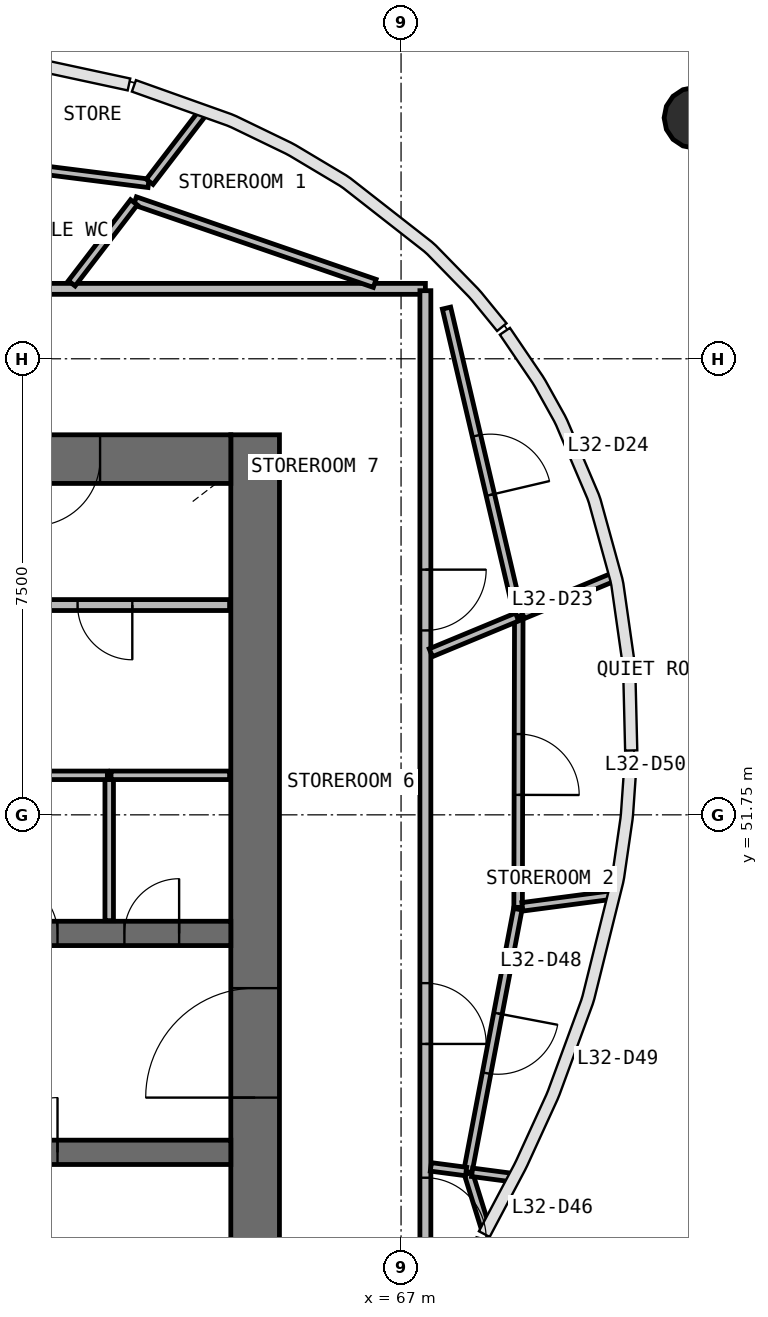
"""IFC4 building model, lengths in metres.
Left out: names, types, materials, properties, quantities, classifications, styles, units other than length and angle.
Written with IfcOpenShell. Run it as: python <this file> out.ifc"""

import sys

from ifc_helpers import new_model, si_unit, direction, frame, frame_2d, origin, origin_2d, place, context, subcontext, project, spatial, rectangle, circle, extrude, source, transform, mapped, element, fill, save


model = new_model("IFC4")
c1 = context("Model", 3, precision=1e-05, world=origin(), true_north=direction((0.0, 1.0)))
c2 = subcontext(c1, "Body", "Model", "MODEL_VIEW")
j1 = project(units=[si_unit("LENGTHUNIT", "METRE"), si_unit("PLANEANGLEUNIT", "RADIAN")], contexts=[c1])
p1 = place(None, origin())
s1 = spatial("IfcSite", under=j1, at=p1, CompositionType="ELEMENT")
p2 = place(p1, origin())
s2 = spatial("IfcBuilding", under=s1, at=p2, CompositionType="ELEMENT")
p3 = place(p2, frame((0.0, 0.0, 137.0)))
s3 = spatial("IfcBuildingStorey", under=s2, at=p3, CompositionType="ELEMENT", Elevation=137.0)
p4 = place(p3, frame((64.6, 38.0, 0.0), z_axis=(0.0, 0.0, 1.0), x_axis=(0.0, 1.0, 0.0)))
e1 = element("IfcWall", 1, at=p4, inside=s3, PredefinedType="SHEAR", context=c2, shape_type="SweptSolid", body=[
    extrude(rectangle(XDim=20.0, YDim=0.8, at=frame_2d((10.0, 0.0))), origin(), (0.0, 0.0, 1.0), 3.9),
])
p5 = place(p4, frame((9.1, 0.0, 0.0)))
e2 = element("IfcOpeningElement", 2, at=p5, cuts=e1, PredefinedType="OPENING", context=c2, shape_type="SweptSolid", body=[
    extrude(rectangle(XDim=1.8, YDim=2.1, at=frame_2d((0.9, 1.05))), frame((0.0, 0.41, 0.0), z_axis=(0.0, -1.0, 0.0), x_axis=(1.0, 0.0, 0.0)), (0.0, 0.0, 1.0), 0.82),
])
p6 = place(p3, frame((64.2, 57.6, 0.0), z_axis=(0.0, 0.0, 1.0), x_axis=(-1.0, 0.0, 0.0)))
e3 = element("IfcWall", 3, at=p6, inside=s3, PredefinedType="SHEAR", context=c2, shape_type="SweptSolid", body=[
    extrude(rectangle(XDim=24.4, YDim=0.8, at=frame_2d((12.2, 0.0))), origin(), (0.0, 0.0, 1.0), 3.9),
])
p7 = place(p6, frame((21.65, 0.0, 0.0)))
e4 = element("IfcOpeningElement", 4, at=p7, cuts=e3, PredefinedType="OPENING", context=c2, shape_type="SweptSolid", body=[
    extrude(rectangle(XDim=1.1, YDim=2.1, at=frame_2d((0.55, 1.05))), frame((0.0, 0.41, 0.0), z_axis=(0.0, -1.0, 0.0), x_axis=(1.0, 0.0, 0.0)), (0.0, 0.0, 1.0), 0.82),
])
p8 = place(p6, frame((2.15, 0.0, 0.0)))
e5 = element("IfcOpeningElement", 5, at=p8, cuts=e3, PredefinedType="OPENING", context=c2, shape_type="SweptSolid", body=[
    extrude(rectangle(XDim=1.1, YDim=2.1, at=frame_2d((0.55, 1.05))), frame((0.0, 0.41, 0.0), z_axis=(0.0, -1.0, 0.0), x_axis=(1.0, 0.0, 0.0)), (0.0, 0.0, 1.0), 0.82),
])
p9 = place(p3, frame((39.8, 49.8, 0.0), z_axis=(0.0, 0.0, 1.0), x_axis=(1.0, 0.0, 0.0)))
e6 = element("IfcWall", 6, at=p9, inside=s3, PredefinedType="SHEAR", context=c2, shape_type="SweptSolid", body=[
    extrude(rectangle(XDim=24.4, YDim=0.4, at=frame_2d((12.2, 0.0))), origin(), (0.0, 0.0, 1.0), 3.9),
])
p10 = place(p9, frame((13.6, 0.0, 0.0)))
e7 = element("IfcOpeningElement", 7, at=p10, cuts=e6, PredefinedType="OPENING", context=c2, shape_type="SweptSolid", body=[
    extrude(rectangle(XDim=1.1, YDim=2.1, at=frame_2d((0.55, 1.05))), frame((0.0, 0.21, 0.0), z_axis=(0.0, -1.0, 0.0), x_axis=(1.0, 0.0, 0.0)), (0.0, 0.0, 1.0), 0.42),
])
p11 = place(p9, frame((16.1, 0.0, 0.0)))
e8 = element("IfcOpeningElement", 8, at=p11, cuts=e6, PredefinedType="OPENING", context=c2, shape_type="SweptSolid", body=[
    extrude(rectangle(XDim=1.1, YDim=2.1, at=frame_2d((0.55, 1.05))), frame((0.0, 0.21, 0.0), z_axis=(0.0, -1.0, 0.0), x_axis=(1.0, 0.0, 0.0)), (0.0, 0.0, 1.0), 0.42),
])
p12 = place(p9, frame((18.6, 0.0, 0.0)))
e9 = element("IfcOpeningElement", 9, at=p12, cuts=e6, PredefinedType="OPENING", context=c2, shape_type="SweptSolid", body=[
    extrude(rectangle(XDim=1.1, YDim=2.1, at=frame_2d((0.55, 1.05))), frame((0.0, 0.21, 0.0), z_axis=(0.0, -1.0, 0.0), x_axis=(1.0, 0.0, 0.0)), (0.0, 0.0, 1.0), 0.42),
])
p13 = place(p9, frame((20.65, 0.0, 0.0)))
e10 = element("IfcOpeningElement", 10, at=p13, cuts=e6, PredefinedType="OPENING", context=c2, shape_type="SweptSolid", body=[
    extrude(rectangle(XDim=0.9, YDim=2.1, at=frame_2d((0.45, 1.05))), frame((0.0, 0.21, 0.0), z_axis=(0.0, -1.0, 0.0), x_axis=(1.0, 0.0, 0.0)), (0.0, 0.0, 1.0), 0.42),
])
p14 = place(p9, frame((22.65, 0.0, 0.0)))
e11 = element("IfcOpeningElement", 11, at=p14, cuts=e6, PredefinedType="OPENING", context=c2, shape_type="SweptSolid", body=[
    extrude(rectangle(XDim=0.9, YDim=2.1, at=frame_2d((0.45, 1.05))), frame((0.0, 0.21, 0.0), z_axis=(0.0, -1.0, 0.0), x_axis=(1.0, 0.0, 0.0)), (0.0, 0.0, 1.0), 0.42),
])
p15 = place(p3, frame((39.8, 46.2, 0.0), z_axis=(0.0, 0.0, 1.0), x_axis=(1.0, 0.0, 0.0)))
e12 = element("IfcWall", 12, at=p15, inside=s3, PredefinedType="SHEAR", context=c2, shape_type="SweptSolid", body=[
    extrude(rectangle(XDim=24.4, YDim=0.4, at=frame_2d((12.2, 0.0))), origin(), (0.0, 0.0, 1.0), 3.9),
])
p16 = place(p15, frame((13.6, 0.0, 0.0)))
e13 = element("IfcOpeningElement", 13, at=p16, cuts=e12, PredefinedType="OPENING", context=c2, shape_type="SweptSolid", body=[
    extrude(rectangle(XDim=1.1, YDim=2.1, at=frame_2d((0.55, 1.05))), frame((0.0, 0.21, 0.0), z_axis=(0.0, -1.0, 0.0), x_axis=(1.0, 0.0, 0.0)), (0.0, 0.0, 1.0), 0.42),
])
p17 = place(p15, frame((16.1, 0.0, 0.0)))
e14 = element("IfcOpeningElement", 14, at=p17, cuts=e12, PredefinedType="OPENING", context=c2, shape_type="SweptSolid", body=[
    extrude(rectangle(XDim=1.1, YDim=2.1, at=frame_2d((0.55, 1.05))), frame((0.0, 0.21, 0.0), z_axis=(0.0, -1.0, 0.0), x_axis=(1.0, 0.0, 0.0)), (0.0, 0.0, 1.0), 0.42),
])
p18 = place(p15, frame((18.6, 0.0, 0.0)))
e15 = element("IfcOpeningElement", 15, at=p18, cuts=e12, PredefinedType="OPENING", context=c2, shape_type="SweptSolid", body=[
    extrude(rectangle(XDim=1.1, YDim=2.1, at=frame_2d((0.55, 1.05))), frame((0.0, 0.21, 0.0), z_axis=(0.0, -1.0, 0.0), x_axis=(1.0, 0.0, 0.0)), (0.0, 0.0, 1.0), 0.42),
])
p19 = place(p15, frame((20.65, 0.0, 0.0)))
e16 = element("IfcOpeningElement", 16, at=p19, cuts=e12, PredefinedType="OPENING", context=c2, shape_type="SweptSolid", body=[
    extrude(rectangle(XDim=0.9, YDim=2.1, at=frame_2d((0.45, 1.05))), frame((0.0, 0.21, 0.0), z_axis=(0.0, -1.0, 0.0), x_axis=(1.0, 0.0, 0.0)), (0.0, 0.0, 1.0), 0.42),
])
p20 = place(p15, frame((2.85, 0.0, 0.0)))
e17 = element("IfcOpeningElement", 17, at=p20, cuts=e12, PredefinedType="OPENING", context=c2, shape_type="SweptSolid", body=[
    extrude(rectangle(XDim=0.9, YDim=2.1, at=frame_2d((0.45, 1.05))), frame((0.0, 0.21, 0.0), z_axis=(0.0, -1.0, 0.0), x_axis=(1.0, 0.0, 0.0)), (0.0, 0.0, 1.0), 0.42),
])
m1 = source(origin(), c2, "Body", "SweptSolid", [
    extrude(circle(Radius=0.5, at=origin_2d()), origin(), (0.0, 0.0, 1.0), 3.9),
])
p21 = place(p3, frame((71.826, 63.213, 0.0), z_axis=(0.0, 0.0, 1.0), x_axis=(1.0, 0.0, 0.0)))
e18 = element("IfcColumn", 18, at=p21, inside=s3, PredefinedType="COLUMN", context=c2, shape_type="MappedRepresentation", body=[
    mapped(m1, transform((0.0, 0.0, 0.0), scale=1.0)),
])
p22 = place(p3, frame((36.6, 60.4, 0.0), z_axis=(0.0, 0.0, 1.0), x_axis=(1.0, 0.0, 0.0)))
e19 = element("IfcWall", 19, at=p22, inside=s3, PredefinedType="PARTITIONING", context=c2, shape_type="SweptSolid", body=[
    extrude(rectangle(XDim=30.8, YDim=0.18, at=frame_2d((15.4, 0.0))), origin(), (0.0, 0.0, 1.0), 2.88),
])
p23 = place(p22, frame((22.25, 0.0, 0.0)))
e20 = element("IfcOpeningElement", 20, at=p23, cuts=e19, PredefinedType="OPENING", context=c2, shape_type="SweptSolid", body=[
    extrude(rectangle(XDim=0.9, YDim=2.1, at=frame_2d((0.45, 1.05))), frame((0.0, 0.1, 0.0), z_axis=(0.0, -1.0, 0.0), x_axis=(1.0, 0.0, 0.0)), (0.0, 0.0, 1.0), 0.2),
])
p24 = place(p22, frame((19.65, 0.0, 0.0)))
e21 = element("IfcOpeningElement", 21, at=p24, cuts=e19, PredefinedType="OPENING", context=c2, shape_type="SweptSolid", body=[
    extrude(rectangle(XDim=0.9, YDim=2.1, at=frame_2d((0.45, 1.05))), frame((0.0, 0.1, 0.0), z_axis=(0.0, -1.0, 0.0), x_axis=(1.0, 0.0, 0.0)), (0.0, 0.0, 1.0), 0.2),
])
p25 = place(p22, frame((17.25, 0.0, 0.0)))
e22 = element("IfcOpeningElement", 22, at=p25, cuts=e19, PredefinedType="OPENING", context=c2, shape_type="SweptSolid", body=[
    extrude(rectangle(XDim=0.9, YDim=2.1, at=frame_2d((0.45, 1.05))), frame((0.0, 0.1, 0.0), z_axis=(0.0, -1.0, 0.0), x_axis=(1.0, 0.0, 0.0)), (0.0, 0.0, 1.0), 0.2),
])
p26 = place(p22, frame((14.95, 0.0, 0.0)))
e23 = element("IfcOpeningElement", 23, at=p26, cuts=e19, PredefinedType="OPENING", context=c2, shape_type="SweptSolid", body=[
    extrude(rectangle(XDim=1.0, YDim=2.1, at=frame_2d((0.5, 1.05))), frame((0.0, 0.1, 0.0), z_axis=(0.0, -1.0, 0.0), x_axis=(1.0, 0.0, 0.0)), (0.0, 0.0, 1.0), 0.2),
])
p27 = place(p3, frame((67.4, 60.37, 0.0), z_axis=(0.0, 0.0, 1.0), x_axis=(0.0, -1.0, 0.0)))
e24 = element("IfcWall", 24, at=p27, inside=s3, PredefinedType="PARTITIONING", context=c2, shape_type="SweptSolid", body=[
    extrude(rectangle(XDim=23.638, YDim=0.18, at=frame_2d((11.819, 0.0))), origin(), (0.0, 0.0, 1.0), 2.88),
])
p28 = place(p27, frame((4.587, 0.0, 0.0)))
e25 = element("IfcOpeningElement", 25, at=p28, cuts=e24, PredefinedType="OPENING", context=c2, shape_type="SweptSolid", body=[
    extrude(rectangle(XDim=1.0, YDim=2.1, at=frame_2d((0.5, 1.05))), frame((0.0, 0.1, 0.0), z_axis=(0.0, -1.0, 0.0), x_axis=(1.0, 0.0, 0.0)), (0.0, 0.0, 1.0), 0.2),
])
p29 = place(p27, frame((14.587, 0.0, 0.0)))
e26 = element("IfcOpeningElement", 26, at=p29, cuts=e24, PredefinedType="OPENING", context=c2, shape_type="SweptSolid", body=[
    extrude(rectangle(XDim=1.0, YDim=2.1, at=frame_2d((0.5, 1.05))), frame((0.0, 0.1, 0.0), z_axis=(0.0, -1.0, 0.0), x_axis=(1.0, 0.0, 0.0)), (0.0, 0.0, 1.0), 0.2),
])
p30 = place(p27, frame((11.387, 0.0, 0.0)))
e27 = element("IfcOpeningElement", 27, at=p30, cuts=e24, PredefinedType="OPENING", context=c2, shape_type="SweptSolid", body=[
    extrude(rectangle(XDim=1.0, YDim=2.1, at=frame_2d((0.5, 1.05))), frame((0.0, 0.1, 0.0), z_axis=(0.0, -1.0, 0.0), x_axis=(1.0, 0.0, 0.0)), (0.0, 0.0, 1.0), 0.2),
])
p31 = place(p3, frame((64.18, 55.2, 0.0), z_axis=(0.0, 0.0, 1.0), x_axis=(-1.0, 0.0, 0.0)))
e28 = element("IfcWall", 28, at=p31, inside=s3, PredefinedType="PARTITIONING", context=c2, shape_type="SweptSolid", body=[
    extrude(rectangle(XDim=3.95, YDim=0.18, at=frame_2d((1.975, 0.0))), origin(), (0.0, 0.0, 1.0), 2.7),
])
p32 = place(p31, frame((1.6, 0.0, 0.0)))
e29 = element("IfcOpeningElement", 29, at=p32, cuts=e28, PredefinedType="OPENING", context=c2, shape_type="SweptSolid", body=[
    extrude(rectangle(XDim=0.9, YDim=2.1, at=frame_2d((0.45, 1.05))), frame((0.0, 0.1, 0.0), z_axis=(0.0, -1.0, 0.0), x_axis=(1.0, 0.0, 0.0)), (0.0, 0.0, 1.0), 0.2),
])
p33 = place(p3, frame((67.748, 60.083, 0.0), z_axis=(0.0, 0.0, 1.0), x_axis=(0.228252449255, -0.973601982028, 0.0)))
e30 = element("IfcWall", 30, at=p33, inside=s3, PredefinedType="PARTITIONING", context=c2, shape_type="SweptSolid", body=[
    extrude(rectangle(XDim=5.206, YDim=0.14, at=frame_2d((2.603, 0.0))), origin(), (0.0, 0.0, 1.0), 2.88),
])
p34 = place(p33, frame((2.156, 0.0, 0.0)))
e31 = element("IfcOpeningElement", 31, at=p34, cuts=e30, PredefinedType="OPENING", context=c2, shape_type="SweptSolid", body=[
    extrude(rectangle(XDim=1.0, YDim=2.1, at=frame_2d((0.5, 1.05))), frame((0.0, 0.08, 0.0), z_axis=(0.0, -1.0, 0.0), x_axis=(1.0, 0.0, 0.0)), (0.0, 0.0, 1.0), 0.16),
])
p35 = place(p3, frame((68.936, 54.985, 0.0), z_axis=(0.0, 0.0, 1.0), x_axis=(-0.002258257432, -0.999997450133, 0.0)))
e32 = element("IfcWall", 32, at=p35, inside=s3, PredefinedType="PARTITIONING", context=c2, shape_type="SweptSolid", body=[
    extrude(rectangle(XDim=4.757, YDim=0.14, at=frame_2d((2.378, 0.0))), origin(), (0.0, 0.0, 1.0), 2.88),
])
p36 = place(p35, frame((1.907, 0.0, 0.0)))
e33 = element("IfcOpeningElement", 33, at=p36, cuts=e32, PredefinedType="OPENING", context=c2, shape_type="SweptSolid", body=[
    extrude(rectangle(XDim=1.0, YDim=2.1, at=frame_2d((0.5, 1.05))), frame((0.0, 0.08, 0.0), z_axis=(0.0, -1.0, 0.0), x_axis=(1.0, 0.0, 0.0)), (0.0, 0.0, 1.0), 0.16),
])
p37 = place(p3, frame((62.847, 62.136, 0.0), z_axis=(0.0, 0.0, 1.0), x_axis=(-0.992110428367, 0.125367052792, 0.0)))
e34 = element("IfcWall", 34, at=p37, inside=s3, PredefinedType="PARTITIONING", context=c2, shape_type="SweptSolid", body=[
    extrude(rectangle(XDim=4.781, YDim=0.14, at=frame_2d((2.39, 0.0))), origin(), (0.0, 0.0, 1.0), 2.88),
])
p38 = place(p3, frame((66.567, 60.49, 0.0), z_axis=(0.0, 0.0, 1.0), x_axis=(-0.94557008328, 0.325418526834, 0.0)))
e35 = element("IfcWall", 35, at=p38, inside=s3, PredefinedType="PARTITIONING", context=c2, shape_type="SweptSolid", body=[
    extrude(rectangle(XDim=4.169, YDim=0.14, at=frame_2d((2.084, 0.0))), origin(), (0.0, 0.0, 1.0), 2.88),
])
p39 = place(p3, frame((68.92, 50.199, 0.0), z_axis=(0.0, 0.0, 1.0), x_axis=(-0.186739450269, -0.982409475582, 0.0)))
e36 = element("IfcWall", 36, at=p39, inside=s3, PredefinedType="PARTITIONING", context=c2, shape_type="SweptSolid", body=[
    extrude(rectangle(XDim=4.396, YDim=0.14, at=frame_2d((2.198, 0.0))), origin(), (0.0, 0.0, 1.0), 2.88),
])
p40 = place(p39, frame((1.746, 0.0, 0.0)))
e37 = element("IfcOpeningElement", 37, at=p40, cuts=e36, PredefinedType="OPENING", context=c2, shape_type="SweptSolid", body=[
    extrude(rectangle(XDim=1.0, YDim=2.1, at=frame_2d((0.5, 1.05))), frame((0.0, 0.08, 0.0), z_axis=(0.0, -1.0, 0.0), x_axis=(1.0, 0.0, 0.0)), (0.0, 0.0, 1.0), 0.16),
])
p41 = place(p3, frame((62.2, 50.01, 0.0), z_axis=(0.0, 0.0, 1.0), x_axis=(0.0, 1.0, 0.0)))
e38 = element("IfcWall", 38, at=p41, inside=s3, PredefinedType="PARTITIONING", context=c2, shape_type="SweptSolid", body=[
    extrude(rectangle(XDim=2.39, YDim=0.14, at=frame_2d((1.195, 0.0))), origin(), (0.0, 0.0, 1.0), 2.88),
])
p42 = place(p3, frame((62.17, 52.4, 0.0), z_axis=(0.0, 0.0, 1.0), x_axis=(-1.0, 0.0, 0.0)))
e39 = element("IfcWall", 39, at=p42, inside=s3, PredefinedType="PARTITIONING", context=c2, shape_type="SweptSolid", body=[
    extrude(rectangle(XDim=1.94, YDim=0.14, at=frame_2d((0.97, 0.0))), origin(), (0.0, 0.0, 1.0), 2.88),
])
p43 = place(p3, frame((64.18, 52.4, 0.0), z_axis=(0.0, 0.0, 1.0), x_axis=(-1.0, 0.0, 0.0)))
e40 = element("IfcWall", 40, at=p43, inside=s3, PredefinedType="PARTITIONING", context=c2, shape_type="SweptSolid", body=[
    extrude(rectangle(XDim=1.95, YDim=0.14, at=frame_2d((0.975, 0.0))), origin(), (0.0, 0.0, 1.0), 2.88),
])
p44 = place(p3, frame((62.865, 62.16, 0.0), z_axis=(0.0, 0.0, 1.0), x_axis=(0.608793777292, 0.793328517532, 0.0)))
e41 = element("IfcWall", 41, at=p44, inside=s3, PredefinedType="PARTITIONING", context=c2, shape_type="SweptSolid", body=[
    extrude(rectangle(XDim=1.429, YDim=0.14, at=frame_2d((0.714, 0.0))), origin(), (0.0, 0.0, 1.0), 2.88),
])
p45 = place(p3, frame((61.584, 60.49, 0.0), z_axis=(0.0, 0.0, 1.0), x_axis=(0.608776244605, 0.793341971664, 0.0)))
e42 = element("IfcWall", 42, at=p45, inside=s3, PredefinedType="PARTITIONING", context=c2, shape_type="SweptSolid", body=[
    extrude(rectangle(XDim=1.68, YDim=0.14, at=frame_2d((0.84, 0.0))), origin(), (0.0, 0.0, 1.0), 2.88),
])
p46 = place(p3, frame((69.002, 55.042, 0.0), z_axis=(0.0, 0.0, 1.0), x_axis=(0.923869135218, 0.382708532686, 0.0)))
e43 = element("IfcWall", 43, at=p46, inside=s3, PredefinedType="PARTITIONING", context=c2, shape_type="SweptSolid", body=[
    extrude(rectangle(XDim=1.592, YDim=0.14, at=frame_2d((0.796, 0.0))), origin(), (0.0, 0.0, 1.0), 2.88),
])
p47 = place(p3, frame((67.49, 54.416, 0.0), z_axis=(0.0, 0.0, 1.0), x_axis=(0.923912182985, 0.382604597635, 0.0)))
e44 = element("IfcWall", 44, at=p47, inside=s3, PredefinedType="PARTITIONING", context=c2, shape_type="SweptSolid", body=[
    extrude(rectangle(XDim=1.535, YDim=0.14, at=frame_2d((0.768, 0.0))), origin(), (0.0, 0.0, 1.0), 2.88),
])
p48 = place(p3, frame((68.995, 50.238, 0.0), z_axis=(0.0, 0.0, 1.0), x_axis=(0.991440137129, 0.130562071405, 0.0)))
e45 = element("IfcWall", 45, at=p48, inside=s3, PredefinedType="PARTITIONING", context=c2, shape_type="SweptSolid", body=[
    extrude(rectangle(XDim=1.468, YDim=0.14, at=frame_2d((0.734, 0.0))), origin(), (0.0, 0.0, 1.0), 2.88),
])
p49 = place(p3, frame((68.374, 45.0, 0.0), z_axis=(0.0, 0.0, 1.0), x_axis=(-0.29777626912, 0.954635686296, 0.0)))
e46 = element("IfcWall", 46, at=p49, inside=s3, PredefinedType="PARTITIONING", context=c2, shape_type="SweptSolid", body=[
    extrude(rectangle(XDim=0.892, YDim=0.14, at=frame_2d((0.446, 0.0))), origin(), (0.0, 0.0, 1.0), 2.88),
])
p50 = place(p3, frame((68.168, 45.871, 0.0), z_axis=(0.0, 0.0, 1.0), x_axis=(0.991464764419, -0.130374924413, 0.0)))
e47 = element("IfcWall", 47, at=p50, inside=s3, PredefinedType="PARTITIONING", context=c2, shape_type="SweptSolid", body=[
    extrude(rectangle(XDim=0.635, YDim=0.14, at=frame_2d((0.317, 0.0))), origin(), (0.0, 0.0, 1.0), 2.88),
])
p51 = place(p3, frame((67.49, 45.961, 0.0), z_axis=(0.0, 0.0, 1.0), x_axis=(0.991467089631, -0.130357240609, 0.0)))
e48 = element("IfcWall", 48, at=p51, inside=s3, PredefinedType="PARTITIONING", context=c2, shape_type="SweptSolid", body=[
    extrude(rectangle(XDim=0.584, YDim=0.14, at=frame_2d((0.292, 0.0))), origin(), (0.0, 0.0, 1.0), 2.88),
])
m2 = source(origin(), c2, "Body", "SweptSolid", [
    extrude(rectangle(XDim=1.8, YDim=2.1, at=frame_2d((0.9, 1.05))), frame((0.0, 0.025, 0.0), z_axis=(0.0, -1.0, 0.0), x_axis=(1.0, 0.0, 0.0)), (0.0, 0.0, 1.0), 0.05),
])
p52 = place(p5, origin())
e49 = element("IfcDoor", 49, at=p52, inside=s3, OperationType="SINGLE_SWING_LEFT", PredefinedType="DOOR", context=c2, shape_type="MappedRepresentation", body=[
    mapped(m2, transform((0.0, 0.0, 0.0), scale=1.0)),
])
fill(e2, e49)
m3 = source(origin(), c2, "Body", "SweptSolid", [
    extrude(rectangle(XDim=1.1, YDim=2.1, at=frame_2d((0.55, 1.05))), frame((0.0, 0.025, 0.0), z_axis=(0.0, -1.0, 0.0), x_axis=(1.0, 0.0, 0.0)), (0.0, 0.0, 1.0), 0.05),
])
p53 = place(p8, origin())
e50 = element("IfcDoor", 50, at=p53, inside=s3, OperationType="SINGLE_SWING_RIGHT", PredefinedType="DOOR", context=c2, shape_type="MappedRepresentation", body=[
    mapped(m3, transform((0.0, 0.0, 0.0), scale=1.0)),
])
fill(e5, e50)
m4 = source(origin(), c2, "Body", "SweptSolid", [
    extrude(rectangle(XDim=1.0, YDim=2.1, at=frame_2d((0.5, 1.05))), frame((0.0, 0.025, 0.0), z_axis=(0.0, -1.0, 0.0), x_axis=(1.0, 0.0, 0.0)), (0.0, 0.0, 1.0), 0.05),
])
p54 = place(p28, origin())
e51 = element("IfcDoor", 51, at=p54, inside=s3, OperationType="SINGLE_SWING_LEFT", PredefinedType="DOOR", context=c2, shape_type="MappedRepresentation", body=[
    mapped(m4, transform((0.0, 0.0, 0.0), scale=1.0)),
])
fill(e25, e51)
p55 = place(p34, origin())
e52 = element("IfcDoor", 52, at=p55, inside=s3, OperationType="SINGLE_SWING_RIGHT", PredefinedType="DOOR", context=c2, shape_type="MappedRepresentation", body=[
    mapped(m4, transform((0.0, 0.0, 0.0), scale=1.0)),
])
fill(e31, e52)
p56 = place(p29, origin())
e53 = element("IfcDoor", 53, at=p56, inside=s3, OperationType="SINGLE_SWING_RIGHT", PredefinedType="DOOR", context=c2, shape_type="MappedRepresentation", body=[
    mapped(m4, transform((0.0, 0.0, 0.0), scale=1.0)),
])
fill(e26, e53)
p57 = place(p30, origin())
e54 = element("IfcDoor", 54, at=p57, inside=s3, OperationType="SINGLE_SWING_RIGHT", PredefinedType="DOOR", context=c2, shape_type="MappedRepresentation", body=[
    mapped(m4, transform((0.0, 0.0, 0.0), scale=1.0)),
])
fill(e27, e54)
p58 = place(p40, origin())
e55 = element("IfcDoor", 55, at=p58, inside=s3, OperationType="SINGLE_SWING_LEFT", PredefinedType="DOOR", context=c2, shape_type="MappedRepresentation", body=[
    mapped(m4, transform((0.0, 0.0, 0.0), scale=1.0)),
])
fill(e37, e55)
p59 = place(p36, origin())
e56 = element("IfcDoor", 56, at=p59, inside=s3, OperationType="SINGLE_SWING_RIGHT", PredefinedType="DOOR", context=c2, shape_type="MappedRepresentation", body=[
    mapped(m4, transform((0.0, 0.0, 0.0), scale=1.0)),
])
fill(e33, e56)
m5 = source(origin(), c2, "Body", "SweptSolid", [
    extrude(rectangle(XDim=0.9, YDim=2.1, at=frame_2d((0.45, 1.05))), frame((0.0, 0.025, 0.0), z_axis=(0.0, -1.0, 0.0), x_axis=(1.0, 0.0, 0.0)), (0.0, 0.0, 1.0), 0.05),
])
p60 = place(p19, origin())
e57 = element("IfcDoor", 57, at=p60, inside=s3, OperationType="SINGLE_SWING_RIGHT", PredefinedType="DOOR", context=c2, shape_type="MappedRepresentation", body=[
    mapped(m5, transform((0.0, 0.0, 0.0), scale=1.0)),
])
fill(e16, e57)
p61 = place(p13, origin())
e58 = element("IfcDoor", 58, at=p61, inside=s3, OperationType="SINGLE_SWING_LEFT", PredefinedType="DOOR", context=c2, shape_type="MappedRepresentation", body=[
    mapped(m5, transform((0.0, 0.0, 0.0), scale=1.0)),
])
fill(e10, e58)
p62 = place(p14, origin())
e59 = element("IfcDoor", 59, at=p62, inside=s3, OperationType="SINGLE_SWING_RIGHT", PredefinedType="DOOR", context=c2, shape_type="MappedRepresentation", body=[
    mapped(m5, transform((0.0, 0.0, 0.0), scale=1.0)),
])
fill(e11, e59)
p63 = place(p32, origin())
e60 = element("IfcDoor", 60, at=p63, inside=s3, OperationType="SINGLE_SWING_LEFT", PredefinedType="DOOR", context=c2, shape_type="MappedRepresentation", body=[
    mapped(m5, transform((0.0, 0.0, 0.0), scale=1.0)),
])
fill(e29, e60)
save(model, sys.argv[1])
